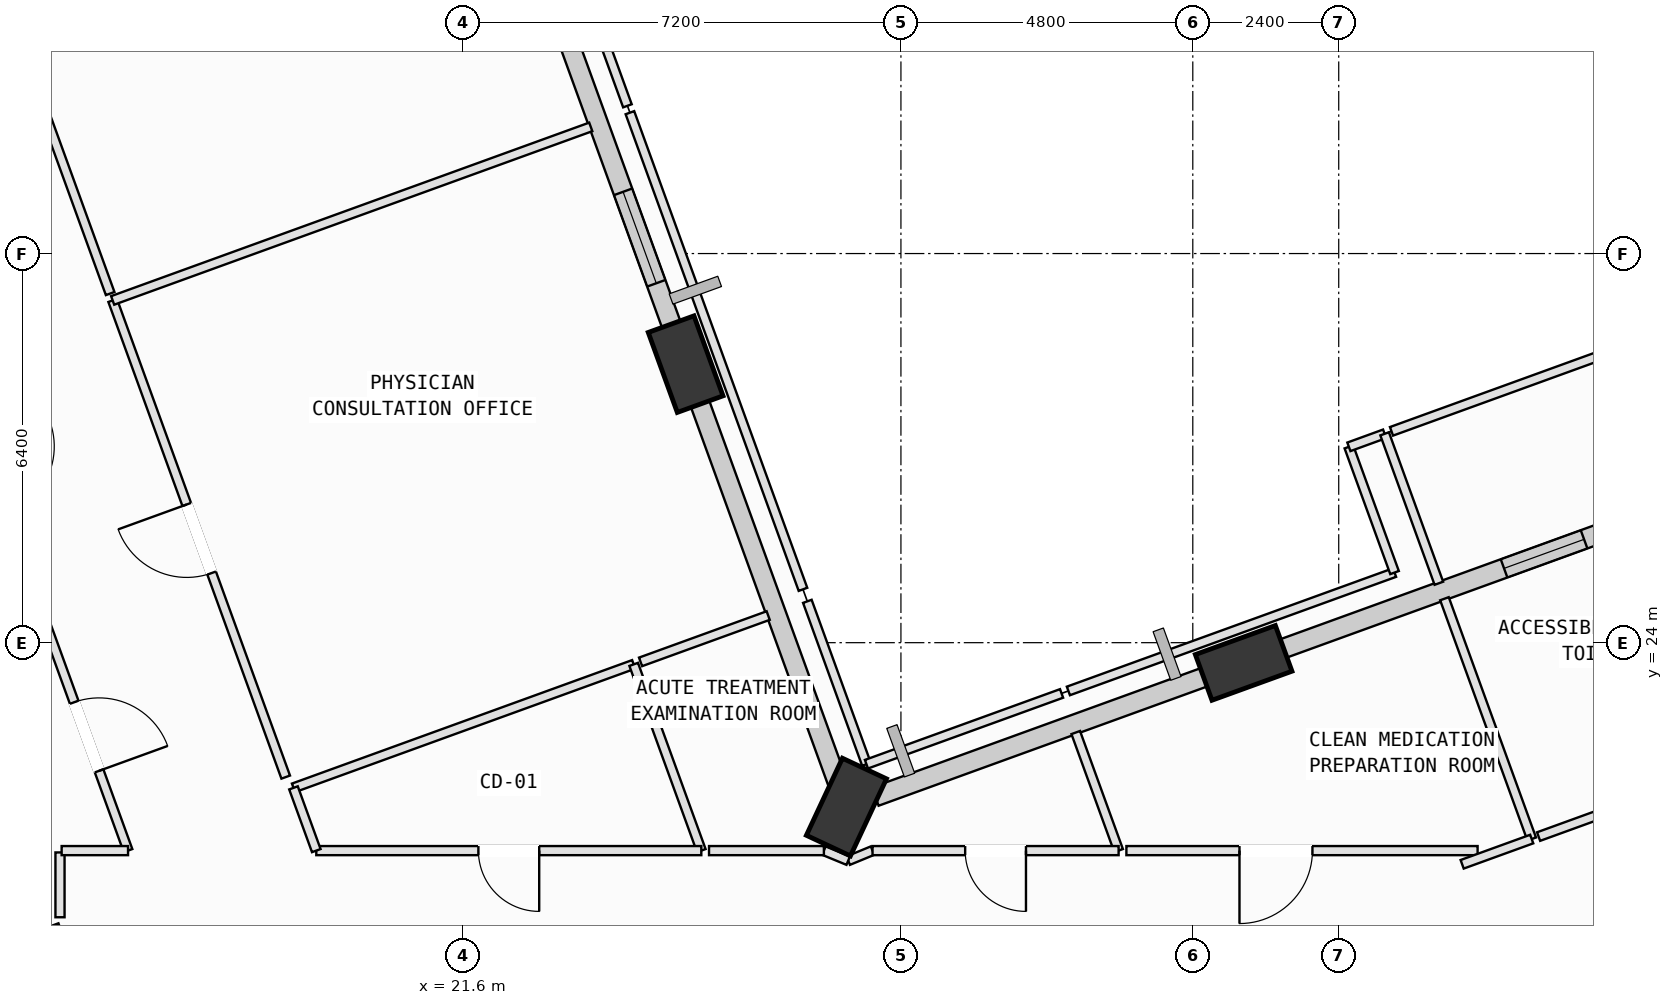
"""IFC4 building model, lengths in metres.
Left out: names, types, materials, properties, quantities, classifications, styles, units other than length and angle.
Written with IfcOpenShell. Run it as: python <this file> out.ifc"""

import sys

from ifc_helpers import new_model, si_unit, direction, frame, frame_2d, origin, origin_2d, place, context, subcontext, project, spatial, rectangle, extrude, element, fill, save


model = new_model("IFC4")
c1 = context("Model", 3, precision=1e-05, world=origin(), true_north=direction((0.0, 1.0)))
c2 = subcontext(c1, "Body", "Model", "MODEL_VIEW")
j1 = project(units=[si_unit("LENGTHUNIT", "METRE"), si_unit("PLANEANGLEUNIT", "RADIAN")], contexts=[c1])
p1 = place(None, origin())
s1 = spatial("IfcSite", under=j1, at=p1, CompositionType="ELEMENT")
p2 = place(p1, origin())
s2 = spatial("IfcBuilding", under=s1, at=p2, CompositionType="ELEMENT")
p3 = place(p2, frame((0.0, 0.0, 108.4)))
s3 = spatial("IfcBuildingStorey", under=s2, at=p3, CompositionType="ELEMENT", Elevation=108.4)
p4 = place(p3, frame((34.437, 23.667, 0.002), z_axis=(0.004703933122, 0.003482132311, 0.999982873737), x_axis=(-0.833505781838, 0.552507125823, 0.001996886739)))
e1 = element("IfcColumn", 1, at=p4, inside=s3, PredefinedType="COLUMN", context=c2, shape_type="SweptSolid", body=[
    extrude(rectangle(XDim=1.4, YDim=0.8, at=origin_2d()), origin(), (0.0, 0.0, 1.0), 3.996),
])
p5 = place(p3, frame((27.904, 21.296, 0.002), z_axis=(0.014717287158, -0.023511018904, 0.999615242705), x_axis=(-0.12160638873, 0.992260272307, 0.025128434512)))
e2 = element("IfcColumn", 2, at=p5, inside=s3, PredefinedType="COLUMN", context=c2, shape_type="SweptSolid", body=[
    extrude(rectangle(XDim=1.4, YDim=0.8, at=origin_2d()), origin(), (0.0, 0.0, 1.0), 3.998),
])
p6 = place(p3, frame((25.259, 28.581, 0.002), z_axis=(-0.015383873199, -0.034674761813, 0.999280239642), x_axis=(0.069047531169, 0.996975907814, 0.035657785661)))
e3 = element("IfcColumn", 3, at=p6, inside=s3, PredefinedType="COLUMN", context=c2, shape_type="SweptSolid", body=[
    extrude(rectangle(XDim=1.4, YDim=0.8, at=origin_2d()), origin(), (0.0, 0.0, 1.0), 3.999),
])
p7 = place(p3, frame((34.914, 23.841, 0.0), z_axis=(0.0, 0.0, 1.0), x_axis=(0.939995247313, 0.34118753645, 0.0)))
e4 = element("IfcWall", 4, at=p7, inside=s3, PredefinedType="SOLIDWALL", context=c2, shape_type="SweptSolid", body=[
    extrude(rectangle(XDim=6.211, YDim=0.32, at=frame_2d((3.105, 0.0))), origin(), (0.0, 0.0, 1.0), 3.165),
])
p8 = place(p7, frame((4.048, 0.0, 0.75)))
e5 = element("IfcOpeningElement", 5, at=p8, cuts=e4, PredefinedType="OPENING", context=c2, shape_type="SweptSolid", body=[
    extrude(rectangle(XDim=1.4, YDim=1.85, at=frame_2d((0.7, 0.925))), frame((0.0, 0.17, 0.0), z_axis=(0.0, -1.0, 0.0), x_axis=(1.0, 0.0, 0.0)), (0.0, 0.0, 1.0), 0.34),
])
p9 = place(p3, frame((28.378, 21.469, 0.0), z_axis=(0.0, 0.0, 1.0), x_axis=(0.939995386853, 0.341187152007, 0.0)))
e6 = element("IfcWall", 6, at=p9, inside=s3, PredefinedType="SOLIDWALL", context=c2, shape_type="SweptSolid", body=[
    extrude(rectangle(XDim=5.96, YDim=0.32, at=frame_2d((2.98, 0.0))), origin(), (0.0, 0.0, 1.0), 3.165),
])
p10 = place(p3, frame((25.446, 28.066, 0.0), z_axis=(0.0, 0.0, 1.0), x_axis=(0.341209462928, -0.939987288429, 0.0)))
e7 = element("IfcWall", 7, at=p10, inside=s3, PredefinedType="SOLIDWALL", context=c2, shape_type="SweptSolid", body=[
    extrude(rectangle(XDim=6.76, YDim=0.32, at=frame_2d((3.38, 0.0))), origin(), (0.0, 0.0, 1.0), 2.965),
])
p11 = place(p3, frame((22.987, 34.843, 0.0), z_axis=(0.0, 0.0, 1.0), x_axis=(0.341175974154, -0.939999443968, 0.0)))
e8 = element("IfcWall", 8, at=p11, inside=s3, PredefinedType="SOLIDWALL", context=c2, shape_type="SweptSolid", body=[
    extrude(rectangle(XDim=6.223, YDim=0.32, at=frame_2d((3.111, 0.0))), origin(), (0.0, 0.0, 1.0), 3.165),
])
p12 = place(p11, frame((3.646, 0.0, 0.75)))
e9 = element("IfcOpeningElement", 9, at=p12, cuts=e8, PredefinedType="OPENING", context=c2, shape_type="SweptSolid", body=[
    extrude(rectangle(XDim=1.6, YDim=1.95, at=frame_2d((0.8, 0.975))), frame((0.0, 0.17, 0.0), z_axis=(0.0, -1.0, 0.0), x_axis=(1.0, 0.0, 0.0)), (0.0, 0.0, 1.0), 0.34),
])
p13 = place(p3, frame((39.861, 18.03, 0.0), z_axis=(0.0, 0.0, 1.0), x_axis=(0.939960863027, 0.341282252656, 0.0)))
e10 = element("IfcWall", 10, at=p13, inside=s3, PredefinedType="PARTITIONING", context=c2, shape_type="SweptSolid", body=[
    extrude(rectangle(XDim=4.339, YDim=0.15, at=frame_2d((2.17, 0.0))), origin(), (0.0, 0.0, 1.0), 2.965),
])
p14 = place(p13, frame((1.57, 0.0, 0.0)))
e11 = element("IfcOpeningElement", 11, at=p14, cuts=e10, PredefinedType="OPENING", context=c2, shape_type="SweptSolid", body=[
    extrude(rectangle(XDim=1.2, YDim=2.15, at=frame_2d((0.6, 1.075))), frame((0.0, 0.085, 0.0), z_axis=(0.0, -1.0, 0.0), x_axis=(1.0, 0.0, 0.0)), (0.0, 0.0, 1.0), 0.17),
])
p15 = place(p3, frame((7.515, 16.608, 0.0), z_axis=(0.0, 0.0, 1.0), x_axis=(0.939990996675, 0.341199247025, 0.0)))
e12 = element("IfcWall", 12, at=p15, inside=s3, PredefinedType="PARTITIONING", context=c2, shape_type="SweptSolid", body=[
    extrude(rectangle(XDim=7.931, YDim=0.15, at=frame_2d((3.965, 0.0))), origin(), (0.0, 0.0, 1.0), 3.78),
])
p16 = place(p15, frame((3.365, 0.0, 0.0)))
e13 = element("IfcOpeningElement", 13, at=p16, cuts=e12, PredefinedType="OPENING", context=c2, shape_type="SweptSolid", body=[
    extrude(rectangle(XDim=1.2, YDim=2.15, at=frame_2d((0.6, 1.075))), frame((0.0, 0.085, 0.0), z_axis=(0.0, -1.0, 0.0), x_axis=(1.0, 0.0, 0.0)), (0.0, 0.0, 1.0), 0.17),
])
p17 = place(p3, frame((14.97, 20.55, 0.0), z_axis=(0.0, 0.0, 1.0), x_axis=(0.0, -1.0, 0.0)))
e14 = element("IfcWall", 14, at=p17, inside=s3, PredefinedType="PARTITIONING", context=c2, shape_type="SweptSolid", body=[
    extrude(rectangle(XDim=1.066, YDim=0.15, at=frame_2d((0.533, 0.0))), origin(), (0.0, 0.0, 1.0), 3.78),
])
p18 = place(p3, frame((14.727, 24.332, 0.0), z_axis=(0.0, 0.0, 1.0), x_axis=(0.341237178064, -0.939977227547, 0.0)))
e15 = element("IfcWall", 15, at=p18, inside=s3, PredefinedType="PARTITIONING", context=c2, shape_type="SweptSolid", body=[
    extrude(rectangle(XDim=3.991, YDim=0.15, at=frame_2d((1.996, 0.0))), origin(), (0.0, 0.0, 1.0), 3.78),
])
p19 = place(p18, frame((1.396, 0.0, 0.0)))
e16 = element("IfcOpeningElement", 16, at=p19, cuts=e15, PredefinedType="OPENING", context=c2, shape_type="SweptSolid", body=[
    extrude(rectangle(XDim=1.2, YDim=2.15, at=frame_2d((0.6, 1.075))), frame((0.0, 0.085, 0.0), z_axis=(0.0, -1.0, 0.0), x_axis=(1.0, 0.0, 0.0)), (0.0, 0.0, 1.0), 0.17),
])
p20 = place(p3, frame((16.089, 20.58, 0.0), z_axis=(0.0, 0.0, 1.0), x_axis=(-1.0, 0.0, 0.0)))
e17 = element("IfcWall", 17, at=p20, inside=s3, PredefinedType="PARTITIONING", context=c2, shape_type="SweptSolid", body=[
    extrude(rectangle(XDim=1.092, YDim=0.15, at=frame_2d((0.546, 0.0))), origin(), (0.0, 0.0, 1.0), 3.78),
])
p21 = place(p3, frame((18.81, 21.612, 0.0), z_axis=(0.0, 0.0, 1.0), x_axis=(0.939983691706, 0.341219371266, 0.0)))
e18 = element("IfcWall", 18, at=p21, inside=s3, PredefinedType="PARTITIONING", context=c2, shape_type="SweptSolid", body=[
    extrude(rectangle(XDim=5.952, YDim=0.15, at=frame_2d((2.976, 0.0))), origin(), (0.0, 0.0, 1.0), 3.78),
])
p22 = place(p3, frame((24.405, 23.643, 0.0), z_axis=(0.0, 0.0, 1.0), x_axis=(0.341267786903, -0.939966115146, 0.0)))
e19 = element("IfcWall", 19, at=p22, inside=s3, PredefinedType="PARTITIONING", context=c2, shape_type="SweptSolid", body=[
    extrude(rectangle(XDim=3.259, YDim=0.15, at=frame_2d((1.629, 0.0))), origin(), (0.0, 0.0, 1.0), 2.965),
])
p23 = place(p3, frame((25.517, 20.58, 0.0), z_axis=(0.0, 0.0, 1.0), x_axis=(-1.0, 0.0, 0.0)))
e20 = element("IfcWall", 20, at=p23, inside=s3, PredefinedType="PARTITIONING", context=c2, shape_type="SweptSolid", body=[
    extrude(rectangle(XDim=6.332, YDim=0.15, at=frame_2d((3.166, 0.0))), origin(), (0.0, 0.0, 1.0), 3.78),
])
p24 = place(p23, frame((2.666, 0.0, 0.0)))
e21 = element("IfcOpeningElement", 21, at=p24, cuts=e20, PredefinedType="OPENING", context=c2, shape_type="SweptSolid", body=[
    extrude(rectangle(XDim=1.0, YDim=2.12, at=frame_2d((0.5, 1.06))), frame((0.0, 0.085, 0.0), z_axis=(0.0, -1.0, 0.0), x_axis=(1.0, 0.0, 0.0)), (0.0, 0.0, 1.0), 0.17),
])
p25 = place(p3, frame((19.185, 20.58, 0.0), z_axis=(0.0, 0.0, 1.0), x_axis=(-0.34152881966, 0.939871302542, 0.0)))
e22 = element("IfcWall", 22, at=p25, inside=s3, PredefinedType="PARTITIONING", context=c2, shape_type="SweptSolid", body=[
    extrude(rectangle(XDim=1.098, YDim=0.15, at=frame_2d((0.549, 0.0))), origin(), (0.0, 0.0, 1.0), 3.78),
])
p26 = place(p3, frame((28.333, 20.58, 0.0), z_axis=(0.0, 0.0, 1.0), x_axis=(-0.924373933535, -0.38148765511, 0.0)))
e23 = element("IfcWall", 23, at=p26, inside=s3, PredefinedType="PARTITIONING", context=c2, shape_type="SweptSolid", body=[
    extrude(rectangle(XDim=0.433, YDim=0.15, at=frame_2d((0.216, 0.0))), origin(), (0.0, 0.0, 1.0), 3.78),
])
p27 = place(p3, frame((27.933, 20.415, 0.0), z_axis=(0.0, 0.0, 1.0), x_axis=(-0.92445599798, 0.381288745964, 0.0)))
e24 = element("IfcWall", 24, at=p27, inside=s3, PredefinedType="PARTITIONING", context=c2, shape_type="SweptSolid", body=[
    extrude(rectangle(XDim=0.433, YDim=0.15, at=frame_2d((0.216, 0.0))), origin(), (0.0, 0.0, 1.0), 3.78),
])
p28 = place(p3, frame((27.533, 20.58, 0.0), z_axis=(0.0, 0.0, 1.0), x_axis=(-1.0, 0.0, 0.0)))
e25 = element("IfcWall", 25, at=p28, inside=s3, PredefinedType="PARTITIONING", context=c2, shape_type="SweptSolid", body=[
    extrude(rectangle(XDim=1.889, YDim=0.15, at=frame_2d((0.944, 0.0))), origin(), (0.0, 0.0, 1.0), 3.78),
])
p29 = place(p3, frame((24.518, 23.684, 0.0), z_axis=(0.0, 0.0, 1.0), x_axis=(0.939975253555, 0.341242615604, 0.0)))
e26 = element("IfcWall", 26, at=p29, inside=s3, PredefinedType="PARTITIONING", context=c2, shape_type="SweptSolid", body=[
    extrude(rectangle(XDim=2.233, YDim=0.15, at=frame_2d((1.116, 0.0))), origin(), (0.0, 0.0, 1.0), 3.78),
])
p30 = place(p3, frame((27.261, 24.68, 0.0), z_axis=(0.0, 0.0, 1.0), x_axis=(0.341048237996, -0.940045796416, 0.0)))
e27 = element("IfcWall", 27, at=p30, inside=s3, PredefinedType="PARTITIONING", context=c2, shape_type="SweptSolid", body=[
    extrude(rectangle(XDim=2.85, YDim=0.15, at=frame_2d((1.425, 0.0))), origin(), (0.0, 0.0, 1.0), 3.78),
])
p31 = place(p3, frame((28.233, 22.001, 0.0), z_axis=(0.0, 0.0, 1.0), x_axis=(0.940060422903, 0.34100791969, 0.0)))
e28 = element("IfcWall", 28, at=p31, inside=s3, PredefinedType="PARTITIONING", context=c2, shape_type="SweptSolid", body=[
    extrude(rectangle(XDim=3.414, YDim=0.15, at=frame_2d((1.707, 0.0))), origin(), (0.0, 0.0, 1.0), 3.78),
])
p32 = place(p3, frame((31.675, 22.522, 0.0), z_axis=(0.0, 0.0, 1.0), x_axis=(0.341183161149, -0.939996835393, 0.0)))
e29 = element("IfcWall", 29, at=p32, inside=s3, PredefinedType="PARTITIONING", context=c2, shape_type="SweptSolid", body=[
    extrude(rectangle(XDim=2.066, YDim=0.15, at=frame_2d((1.033, 0.0))), origin(), (0.0, 0.0, 1.0), 3.78),
])
p33 = place(p3, frame((32.38, 20.58, 0.0), z_axis=(0.0, 0.0, 1.0), x_axis=(-1.0, 0.0, 0.0)))
e30 = element("IfcWall", 30, at=p33, inside=s3, PredefinedType="PARTITIONING", context=c2, shape_type="SweptSolid", body=[
    extrude(rectangle(XDim=4.047, YDim=0.15, at=frame_2d((2.023, 0.0))), origin(), (0.0, 0.0, 1.0), 3.78),
])
p34 = place(p33, frame((1.523, 0.0, 0.0)))
e31 = element("IfcOpeningElement", 31, at=p34, cuts=e30, PredefinedType="OPENING", context=c2, shape_type="SweptSolid", body=[
    extrude(rectangle(XDim=1.0, YDim=2.12, at=frame_2d((0.5, 1.06))), frame((0.0, 0.085, 0.0), z_axis=(0.0, -1.0, 0.0), x_axis=(1.0, 0.0, 0.0)), (0.0, 0.0, 1.0), 0.17),
])
p35 = place(p3, frame((38.284, 20.58, 0.0), z_axis=(0.0, 0.0, 1.0), x_axis=(-1.0, 0.0, 0.0)))
e32 = element("IfcWall", 32, at=p35, inside=s3, PredefinedType="PARTITIONING", context=c2, shape_type="SweptSolid", body=[
    extrude(rectangle(XDim=5.776, YDim=0.15, at=frame_2d((2.888, 0.0))), origin(), (0.0, 0.0, 1.0), 3.365),
])
p36 = place(p35, frame((2.716, 0.0, 0.0)))
e33 = element("IfcOpeningElement", 33, at=p36, cuts=e32, PredefinedType="OPENING", context=c2, shape_type="SweptSolid", body=[
    extrude(rectangle(XDim=1.2, YDim=2.15, at=frame_2d((0.6, 1.075))), frame((0.0, 0.085, 0.0), z_axis=(0.0, -1.0, 0.0), x_axis=(1.0, 0.0, 0.0)), (0.0, 0.0, 1.0), 0.17),
])
p37 = place(p3, frame((31.554, 23.206, 0.0), z_axis=(0.0, 0.0, 1.0), x_axis=(0.939991879214, 0.341196815654, 0.0)))
e34 = element("IfcWall", 34, at=p37, inside=s3, PredefinedType="PARTITIONING", context=c2, shape_type="SweptSolid", body=[
    extrude(rectangle(XDim=5.707, YDim=0.15, at=frame_2d((2.853, 0.0))), origin(), (0.0, 0.0, 1.0), 3.78),
])
p38 = place(p3, frame((36.918, 25.153, 0.0), z_axis=(0.0, 0.0, 1.0), x_axis=(-0.341350985007, 0.939935904748, 0.0)))
e35 = element("IfcWall", 35, at=p38, inside=s3, PredefinedType="PARTITIONING", context=c2, shape_type="SweptSolid", body=[
    extrude(rectangle(XDim=2.2, YDim=0.15, at=frame_2d((1.1, 0.0))), origin(), (0.0, 0.0, 1.0), 3.78),
])
p39 = place(p3, frame((36.167, 27.221, 0.0), z_axis=(0.0, 0.0, 1.0), x_axis=(0.939622411687, 0.342212979672, 0.0)))
e36 = element("IfcWall", 36, at=p39, inside=s3, PredefinedType="PARTITIONING", context=c2, shape_type="SweptSolid", body=[
    extrude(rectangle(XDim=0.626, YDim=0.15, at=frame_2d((0.313, 0.0))), origin(), (0.0, 0.0, 1.0), 3.78),
])
p40 = place(p3, frame((36.755, 27.435, 0.0), z_axis=(0.0, 0.0, 1.0), x_axis=(0.341158268685, -0.940005870039, 0.0)))
e37 = element("IfcWall", 37, at=p40, inside=s3, PredefinedType="PARTITIONING", context=c2, shape_type="SweptSolid", body=[
    extrude(rectangle(XDim=2.615, YDim=0.15, at=frame_2d((1.308, 0.0))), origin(), (0.0, 0.0, 1.0), 3.78),
])
p41 = place(p3, frame((37.739, 24.723, 0.0), z_axis=(0.0, 0.0, 1.0), x_axis=(0.341248910369, -0.93997296832, 0.0)))
e38 = element("IfcWall", 38, at=p41, inside=s3, PredefinedType="PARTITIONING", context=c2, shape_type="SweptSolid", body=[
    extrude(rectangle(XDim=4.205, YDim=0.15, at=frame_2d((2.103, 0.0))), origin(), (0.0, 0.0, 1.0), 3.78),
])
p42 = place(p3, frame((39.174, 20.77, 0.0), z_axis=(0.0, 0.0, 1.0), x_axis=(-0.940050872134, -0.341034247253, 0.0)))
e39 = element("IfcWall", 39, at=p42, inside=s3, PredefinedType="PARTITIONING", context=c2, shape_type="SweptSolid", body=[
    extrude(rectangle(XDim=1.217, YDim=0.15, at=frame_2d((0.608, 0.0))), origin(), (0.0, 0.0, 1.0), 3.78),
])
p43 = place(p3, frame((45.239, 22.971, 0.0), z_axis=(0.0, 0.0, 1.0), x_axis=(-0.940017254775, -0.341126898273, 0.0)))
e40 = element("IfcWall", 40, at=p43, inside=s3, PredefinedType="PARTITIONING", context=c2, shape_type="SweptSolid", body=[
    extrude(rectangle(XDim=6.332, YDim=0.15, at=frame_2d((3.166, 0.0))), origin(), (0.0, 0.0, 1.0), 2.945),
])
p44 = place(p43, frame((2.706, 0.0, 0.0)))
e41 = element("IfcOpeningElement", 41, at=p44, cuts=e40, PredefinedType="OPENING", context=c2, shape_type="SweptSolid", body=[
    extrude(rectangle(XDim=0.92, YDim=2.1, at=frame_2d((0.46, 1.05))), frame((0.0, 0.085, 0.0), z_axis=(0.0, -1.0, 0.0), x_axis=(1.0, 0.0, 0.0)), (0.0, 0.0, 1.0), 0.17),
])
p45 = place(p3, frame((36.868, 27.476, 0.0), z_axis=(0.0, 0.0, 1.0), x_axis=(0.940021741488, 0.341114534329, 0.0)))
e42 = element("IfcWall", 42, at=p45, inside=s3, PredefinedType="PARTITIONING", context=c2, shape_type="SweptSolid", body=[
    extrude(rectangle(XDim=6.332, YDim=0.15, at=frame_2d((3.166, 0.0))), origin(), (0.0, 0.0, 1.0), 3.78),
])
p46 = place(p3, frame((18.682, 21.789, 0.0), z_axis=(0.0, 0.0, 1.0), x_axis=(-0.341223593307, 0.93998215907, 0.0)))
e43 = element("IfcWall", 43, at=p46, inside=s3, PredefinedType="PARTITIONING", context=c2, shape_type="SweptSolid", body=[
    extrude(rectangle(XDim=8.34, YDim=0.15, at=frame_2d((4.17, 0.0))), origin(), (0.0, 0.0, 1.0), 3.78),
])
p47 = place(p46, frame((3.57, 0.0, 0.0)))
e44 = element("IfcOpeningElement", 44, at=p47, cuts=e43, PredefinedType="OPENING", context=c2, shape_type="SweptSolid", body=[
    extrude(rectangle(XDim=1.2, YDim=2.15, at=frame_2d((0.6, 1.075))), frame((0.0, 0.085, 0.0), z_axis=(0.0, -1.0, 0.0), x_axis=(1.0, 0.0, 0.0)), (0.0, 0.0, 1.0), 0.17),
])
p48 = place(p3, frame((15.836, 29.629, 0.0), z_axis=(0.0, 0.0, 1.0), x_axis=(0.939996069291, 0.341185271836, 0.0)))
e45 = element("IfcWall", 45, at=p48, inside=s3, PredefinedType="PARTITIONING", context=c2, shape_type="SweptSolid", body=[
    extrude(rectangle(XDim=8.365, YDim=0.15, at=frame_2d((4.183, 0.0))), origin(), (0.0, 0.0, 1.0), 3.78),
])
p49 = place(p3, frame((24.343, 32.717, 0.0), z_axis=(0.0, 0.0, 1.0), x_axis=(0.341214204731, -0.939985567171, 0.0)))
e46 = element("IfcWall", 46, at=p49, inside=s3, PredefinedType="PARTITIONING", context=c2, shape_type="SweptSolid", body=[
    extrude(rectangle(XDim=8.341, YDim=0.15, at=frame_2d((4.17, 0.0))), origin(), (0.0, 0.0, 1.0), 3.78),
])
p50 = place(p3, frame((15.795, 29.742, 0.0), z_axis=(0.0, 0.0, 1.0), x_axis=(-0.341080711776, 0.940034014307, 0.0)))
e47 = element("IfcWall", 47, at=p50, inside=s3, PredefinedType="PARTITIONING", context=c2, shape_type="SweptSolid", body=[
    extrude(rectangle(XDim=7.4, YDim=0.15, at=frame_2d((3.7, 0.0))), origin(), (0.0, 0.0, 1.0), 3.78),
])
p51 = place(p50, frame((3.24, 0.0, 0.0)))
e48 = element("IfcOpeningElement", 48, at=p51, cuts=e47, PredefinedType="OPENING", context=c2, shape_type="SweptSolid", body=[
    extrude(rectangle(XDim=0.92, YDim=2.1, at=frame_2d((0.46, 1.05))), frame((0.0, 0.085, 0.0), z_axis=(0.0, -1.0, 0.0), x_axis=(1.0, 0.0, 0.0)), (0.0, 0.0, 1.0), 0.17),
])
p52 = place(p3, frame((21.778, 39.785, 0.0), z_axis=(0.0, 0.0, 1.0), x_axis=(0.341133611606, -0.940014818517, 0.0)))
e49 = element("IfcWall", 49, at=p52, inside=s3, PredefinedType="PARTITIONING", context=c2, shape_type="SweptSolid", body=[
    extrude(rectangle(XDim=7.399, YDim=0.15, at=frame_2d((3.699, 0.0))), origin(), (0.0, 0.0, 1.0), 3.78),
])
p53 = place(p8, origin())
e50 = element("IfcWindow", 50, at=p53, inside=s3, PartitioningType="SINGLE_PANEL", PredefinedType="WINDOW", context=c2, shape_type="SweptSolid", body=[
    extrude(rectangle(XDim=1.4, YDim=1.85, at=frame_2d((0.7, 0.925))), frame((0.0, 0.03, 0.0), z_axis=(0.0, -1.0, 0.0), x_axis=(1.0, 0.0, 0.0)), (0.0, 0.0, 1.0), 0.06),
])
fill(e5, e50)
p54 = place(p12, origin())
e51 = element("IfcWindow", 51, at=p54, inside=s3, PartitioningType="SINGLE_PANEL", PredefinedType="WINDOW", context=c2, shape_type="SweptSolid", body=[
    extrude(rectangle(XDim=1.6, YDim=1.95, at=frame_2d((0.8, 0.975))), frame((0.0, 0.03, 0.0), z_axis=(0.0, -1.0, 0.0), x_axis=(1.0, 0.0, 0.0)), (0.0, 0.0, 1.0), 0.06),
])
fill(e9, e51)
p55 = place(p19, origin())
e52 = element("IfcDoor", 52, at=p55, inside=s3, OperationType="SINGLE_SWING_RIGHT", PredefinedType="DOOR", context=c2, shape_type="SweptSolid", body=[
    extrude(rectangle(XDim=1.2, YDim=2.15, at=frame_2d((0.6, 1.075))), frame((0.0, 0.025, 0.0), z_axis=(0.0, -1.0, 0.0), x_axis=(1.0, 0.0, 0.0)), (0.0, 0.0, 1.0), 0.05),
])
fill(e16, e52)
p56 = place(p24, origin())
e53 = element("IfcDoor", 53, at=p56, inside=s3, OperationType="SINGLE_SWING_LEFT", PredefinedType="DOOR", context=c2, shape_type="SweptSolid", body=[
    extrude(rectangle(XDim=1.0, YDim=2.12, at=frame_2d((0.5, 1.06))), frame((0.0, 0.025, 0.0), z_axis=(0.0, -1.0, 0.0), x_axis=(1.0, 0.0, 0.0)), (0.0, 0.0, 1.0), 0.05),
])
fill(e21, e53)
p57 = place(p34, origin())
e54 = element("IfcDoor", 54, at=p57, inside=s3, OperationType="SINGLE_SWING_LEFT", PredefinedType="DOOR", context=c2, shape_type="SweptSolid", body=[
    extrude(rectangle(XDim=1.0, YDim=2.12, at=frame_2d((0.5, 1.06))), frame((0.0, 0.025, 0.0), z_axis=(0.0, -1.0, 0.0), x_axis=(1.0, 0.0, 0.0)), (0.0, 0.0, 1.0), 0.05),
])
fill(e31, e54)
p58 = place(p36, origin())
e55 = element("IfcDoor", 55, at=p58, inside=s3, OperationType="SINGLE_SWING_RIGHT", PredefinedType="DOOR", context=c2, shape_type="SweptSolid", body=[
    extrude(rectangle(XDim=1.2, YDim=2.15, at=frame_2d((0.6, 1.075))), frame((0.0, 0.025, 0.0), z_axis=(0.0, -1.0, 0.0), x_axis=(1.0, 0.0, 0.0)), (0.0, 0.0, 1.0), 0.05),
])
fill(e33, e55)
p59 = place(p47, origin())
e56 = element("IfcDoor", 56, at=p59, inside=s3, OperationType="SINGLE_SWING_RIGHT", PredefinedType="DOOR", context=c2, shape_type="SweptSolid", body=[
    extrude(rectangle(XDim=1.2, YDim=2.15, at=frame_2d((0.6, 1.075))), frame((0.0, 0.025, 0.0), z_axis=(0.0, -1.0, 0.0), x_axis=(1.0, 0.0, 0.0)), (0.0, 0.0, 1.0), 0.05),
])
fill(e44, e56)
save(model, sys.argv[1])
